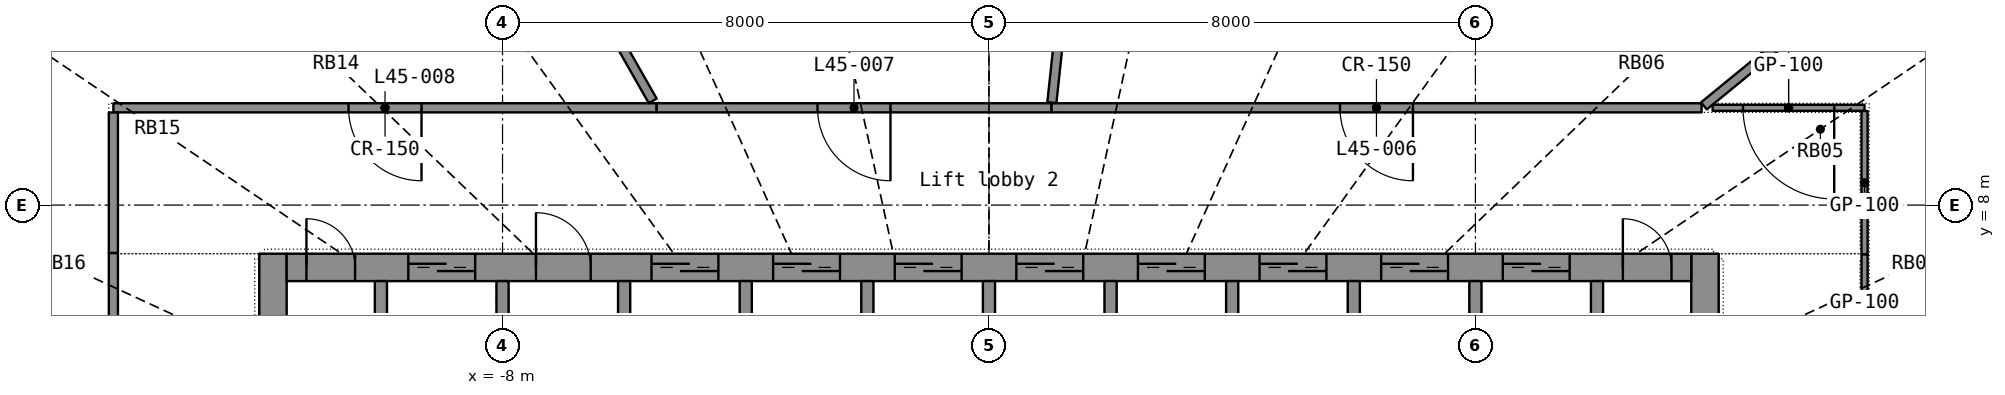
"""IFC4 building model, lengths in metres.
Left out: names, types, materials, properties, quantities, classifications, styles, units other than length and angle.
Written with IfcOpenShell. Run it as: python <this file> out.ifc"""

import sys

from ifc_helpers import new_model, si_unit, direction, frame, frame_2d, origin, place, context, subcontext, project, spatial, rectangle, extrude, element, fill, save


model = new_model("IFC4")
c1 = context("Model", 3, precision=1e-05, world=origin(), true_north=direction((0.0, 1.0)))
c2 = subcontext(c1, "Body", "Model", "MODEL_VIEW")
j1 = project(units=[si_unit("LENGTHUNIT", "METRE"), si_unit("PLANEANGLEUNIT", "RADIAN")], contexts=[c1])
p1 = place(None, origin())
s1 = spatial("IfcSite", under=j1, at=p1, CompositionType="ELEMENT")
p2 = place(p1, origin())
s2 = spatial("IfcBuilding", under=s1, at=p2, CompositionType="ELEMENT")
p3 = place(p2, frame((0.0, 0.0, 186.7)))
s3 = spatial("IfcBuildingStorey", under=s2, at=p3, CompositionType="ELEMENT", Elevation=186.7)
p4 = place(p3, frame((-11.775, -7.2, 0.0), z_axis=(0.0, 0.0, 1.0), x_axis=(0.0, 1.0, 0.0)))
e1 = element("IfcWall", 1, at=p4, inside=s3, PredefinedType="SHEAR", context=c2, shape_type="SweptSolid", body=[
    extrude(rectangle(XDim=14.4, YDim=0.45, at=frame_2d((7.2, 0.0))), origin(), (0.0, 0.0, 1.0), 3.3),
])
p5 = place(p4, frame((6.5, 0.0, 0.0)))
e2 = element("IfcOpeningElement", 2, at=p5, cuts=e1, PredefinedType="OPENING", context=c2, shape_type="SweptSolid", body=[
    extrude(rectangle(XDim=1.4, YDim=2.2, at=frame_2d((0.7, 1.1))), frame((0.0, 0.235, 0.0), z_axis=(0.0, -1.0, 0.0), x_axis=(1.0, 0.0, 0.0)), (0.0, 0.0, 1.0), 0.47),
])
p6 = place(p3, frame((11.775, -7.2, 0.0), z_axis=(0.0, 0.0, 1.0), x_axis=(0.0, 1.0, 0.0)))
e3 = element("IfcWall", 3, at=p6, inside=s3, PredefinedType="SHEAR", context=c2, shape_type="SweptSolid", body=[
    extrude(rectangle(XDim=14.4, YDim=0.45, at=frame_2d((7.2, 0.0))), origin(), (0.0, 0.0, 1.0), 3.3),
])
p7 = place(p6, frame((6.5, 0.0, 0.0)))
e4 = element("IfcOpeningElement", 4, at=p7, cuts=e3, PredefinedType="OPENING", context=c2, shape_type="SweptSolid", body=[
    extrude(rectangle(XDim=1.4, YDim=2.2, at=frame_2d((0.7, 1.1))), frame((0.0, 0.235, 0.0), z_axis=(0.0, -1.0, 0.0), x_axis=(1.0, 0.0, 0.0)), (0.0, 0.0, 1.0), 0.47),
])
p8 = place(p3, frame((-11.55, 6.975, 0.0), z_axis=(0.0, 0.0, 1.0), x_axis=(1.0, 0.0, 0.0)))
e5 = element("IfcWall", 5, at=p8, inside=s3, PredefinedType="SHEAR", context=c2, shape_type="SweptSolid", body=[
    extrude(rectangle(XDim=23.1, YDim=0.45, at=frame_2d((11.55, 0.0))), origin(), (0.0, 0.0, 1.0), 3.3),
])
p9 = place(p8, frame((2.0, 0.0, 0.0)))
e6 = element("IfcOpeningElement", 6, at=p9, cuts=e5, PredefinedType="OPENING", context=c2, shape_type="SweptSolid", body=[
    extrude(rectangle(XDim=1.1, YDim=2.2, at=frame_2d((0.55, 1.1))), frame((0.0, 0.235, 0.0), z_axis=(0.0, -1.0, 0.0), x_axis=(1.0, 0.0, 0.0)), (0.0, 0.0, 1.0), 0.47),
])
p10 = place(p8, frame((6.0, 0.0, 0.0)))
e7 = element("IfcOpeningElement", 7, at=p10, cuts=e5, PredefinedType="OPENING", context=c2, shape_type="SweptSolid", body=[
    extrude(rectangle(XDim=1.1, YDim=2.2, at=frame_2d((0.55, 1.1))), frame((0.0, 0.235, 0.0), z_axis=(0.0, -1.0, 0.0), x_axis=(1.0, 0.0, 0.0)), (0.0, 0.0, 1.0), 0.47),
])
p11 = place(p8, frame((8.0, 0.0, 0.0)))
e8 = element("IfcOpeningElement", 8, at=p11, cuts=e5, PredefinedType="OPENING", context=c2, shape_type="SweptSolid", body=[
    extrude(rectangle(XDim=1.1, YDim=2.2, at=frame_2d((0.55, 1.1))), frame((0.0, 0.235, 0.0), z_axis=(0.0, -1.0, 0.0), x_axis=(1.0, 0.0, 0.0)), (0.0, 0.0, 1.0), 0.47),
])
p12 = place(p8, frame((10.0, 0.0, 0.0)))
e9 = element("IfcOpeningElement", 9, at=p12, cuts=e5, PredefinedType="OPENING", context=c2, shape_type="SweptSolid", body=[
    extrude(rectangle(XDim=1.1, YDim=2.2, at=frame_2d((0.55, 1.1))), frame((0.0, 0.235, 0.0), z_axis=(0.0, -1.0, 0.0), x_axis=(1.0, 0.0, 0.0)), (0.0, 0.0, 1.0), 0.47),
])
p13 = place(p8, frame((12.0, 0.0, 0.0)))
e10 = element("IfcOpeningElement", 10, at=p13, cuts=e5, PredefinedType="OPENING", context=c2, shape_type="SweptSolid", body=[
    extrude(rectangle(XDim=1.1, YDim=2.2, at=frame_2d((0.55, 1.1))), frame((0.0, 0.235, 0.0), z_axis=(0.0, -1.0, 0.0), x_axis=(1.0, 0.0, 0.0)), (0.0, 0.0, 1.0), 0.47),
])
p14 = place(p8, frame((14.0, 0.0, 0.0)))
e11 = element("IfcOpeningElement", 11, at=p14, cuts=e5, PredefinedType="OPENING", context=c2, shape_type="SweptSolid", body=[
    extrude(rectangle(XDim=1.1, YDim=2.2, at=frame_2d((0.55, 1.1))), frame((0.0, 0.235, 0.0), z_axis=(0.0, -1.0, 0.0), x_axis=(1.0, 0.0, 0.0)), (0.0, 0.0, 1.0), 0.47),
])
p15 = place(p8, frame((16.0, 0.0, 0.0)))
e12 = element("IfcOpeningElement", 12, at=p15, cuts=e5, PredefinedType="OPENING", context=c2, shape_type="SweptSolid", body=[
    extrude(rectangle(XDim=1.1, YDim=2.2, at=frame_2d((0.55, 1.1))), frame((0.0, 0.235, 0.0), z_axis=(0.0, -1.0, 0.0), x_axis=(1.0, 0.0, 0.0)), (0.0, 0.0, 1.0), 0.47),
])
p16 = place(p8, frame((18.0, 0.0, 0.0)))
e13 = element("IfcOpeningElement", 13, at=p16, cuts=e5, PredefinedType="OPENING", context=c2, shape_type="SweptSolid", body=[
    extrude(rectangle(XDim=1.1, YDim=2.2, at=frame_2d((0.55, 1.1))), frame((0.0, 0.235, 0.0), z_axis=(0.0, -1.0, 0.0), x_axis=(1.0, 0.0, 0.0)), (0.0, 0.0, 1.0), 0.47),
])
p17 = place(p8, frame((20.0, 0.0, 0.0)))
e14 = element("IfcOpeningElement", 14, at=p17, cuts=e5, PredefinedType="OPENING", context=c2, shape_type="SweptSolid", body=[
    extrude(rectangle(XDim=1.1, YDim=2.2, at=frame_2d((0.55, 1.1))), frame((0.0, 0.235, 0.0), z_axis=(0.0, -1.0, 0.0), x_axis=(1.0, 0.0, 0.0)), (0.0, 0.0, 1.0), 0.47),
])
p18 = place(p8, frame((4.1, 0.0, 0.0)))
e15 = element("IfcOpeningElement", 15, at=p18, cuts=e5, PredefinedType="OPENING", context=c2, shape_type="SweptSolid", body=[
    extrude(rectangle(XDim=0.9, YDim=2.1, at=frame_2d((0.45, 1.05))), frame((0.0, 0.235, 0.0), z_axis=(0.0, -1.0, 0.0), x_axis=(1.0, 0.0, 0.0)), (0.0, 0.0, 1.0), 0.47),
])
p19 = place(p8, frame((0.325, 0.0, 0.0)))
e16 = element("IfcOpeningElement", 16, at=p19, cuts=e5, PredefinedType="OPENING", context=c2, shape_type="SweptSolid", body=[
    extrude(rectangle(XDim=0.8, YDim=2.05, at=frame_2d((0.4, 1.025))), frame((0.0, 0.235, 0.0), z_axis=(0.0, -1.0, 0.0), x_axis=(1.0, 0.0, 0.0)), (0.0, 0.0, 1.0), 0.47),
])
p20 = place(p8, frame((21.975, 0.0, 0.0)))
e17 = element("IfcOpeningElement", 17, at=p20, cuts=e5, PredefinedType="OPENING", context=c2, shape_type="SweptSolid", body=[
    extrude(rectangle(XDim=0.8, YDim=2.05, at=frame_2d((0.4, 1.025))), frame((0.0, 0.235, 0.0), z_axis=(0.0, -1.0, 0.0), x_axis=(1.0, 0.0, 0.0)), (0.0, 0.0, 1.0), 0.47),
])
for number, where, z_axis, x_axis in (
    (18, (-10.0, 3.9, 0.0), (0.0, 0.0, 1.0), (0.0, 1.0, 0.0)),
    (19, (-8.0, 3.9, 0.0), (0.0, 0.0, 1.0), (0.0, 1.0, 0.0)),
    (20, (-6.0, 3.9, 0.0), (0.0, 0.0, 1.0), (0.0, 1.0, 0.0)),
    (21, (-4.0, 3.9, 0.0), (0.0, 0.0, 1.0), (0.0, 1.0, 0.0)),
    (22, (-2.0, 3.9, 0.0), (0.0, 0.0, 1.0), (0.0, 1.0, 0.0)),
    (23, (0.0, 3.9, 0.0), (0.0, 0.0, 1.0), (0.0, 1.0, 0.0)),
    (24, (2.0, 3.9, 0.0), (0.0, 0.0, 1.0), (0.0, 1.0, 0.0)),
    (25, (4.0, 3.9, 0.0), (0.0, 0.0, 1.0), (0.0, 1.0, 0.0)),
    (26, (6.0, 3.9, 0.0), (0.0, 0.0, 1.0), (0.0, 1.0, 0.0)),
    (27, (8.0, 3.9, 0.0), (0.0, 0.0, 1.0), (0.0, 1.0, 0.0)),
    (28, (10.0, 3.9, 0.0), (0.0, 0.0, 1.0), (0.0, 1.0, 0.0)),
):
    element("IfcWall", number, at=place(p3, frame(where, z_axis=z_axis, x_axis=x_axis)), inside=s3, PredefinedType="SHEAR", context=c2, shape_type="SweptSolid", body=[
        extrude(rectangle(XDim=2.85, YDim=0.2, at=frame_2d((1.425, 0.0))), origin(), (0.0, 0.0, 1.0), 3.3),
    ])
p21 = place(p3, frame((11.72, 9.6, 0.0), z_axis=(0.0, 0.0, 1.0), x_axis=(-1.0, 0.0, 0.0)))
e29 = element("IfcWall", 29, at=p21, inside=s3, PredefinedType="PARTITIONING", context=c2, shape_type="SweptSolid", body=[
    extrude(rectangle(XDim=10.695, YDim=0.15, at=frame_2d((5.347, 0.0))), origin(), (0.0, 0.0, 1.0), 2.4),
])
p22 = place(p21, frame((4.747, 0.0, 0.0)))
e30 = element("IfcOpeningElement", 30, at=p22, cuts=e29, PredefinedType="OPENING", context=c2, shape_type="SweptSolid", body=[
    extrude(rectangle(XDim=1.2, YDim=2.2, at=frame_2d((0.6, 1.1))), frame((0.0, 0.085, 0.0), z_axis=(0.0, -1.0, 0.0), x_axis=(1.0, 0.0, 0.0)), (0.0, 0.0, 1.0), 0.17),
])
p23 = place(p3, frame((2.004, 18.766, 0.0), z_axis=(0.0, 0.0, 1.0), x_axis=(-0.106208417, -0.99434389, 0.0)))
e31 = element("IfcWall", 31, at=p23, inside=s3, PredefinedType="PARTITIONING", context=c2, shape_type="SweptSolid", body=[
    extrude(rectangle(XDim=9.133, YDim=0.15, at=frame_2d((4.566, 0.0))), origin(), (0.0, 0.0, 1.0), 2.4),
])
p24 = place(p3, frame((-5.465, 9.6, 0.0), z_axis=(0.0, 0.0, 1.0), x_axis=(-1.0, 0.0, 0.0)))
e32 = element("IfcWall", 32, at=p24, inside=s3, PredefinedType="PARTITIONING", context=c2, shape_type="SweptSolid", body=[
    extrude(rectangle(XDim=8.935, YDim=0.15, at=frame_2d((4.467, 0.0))), origin(), (0.0, 0.0, 1.0), 2.4),
])
p25 = place(p24, frame((3.867, 0.0, 0.0)))
e33 = element("IfcOpeningElement", 33, at=p25, cuts=e32, PredefinedType="OPENING", context=c2, shape_type="SweptSolid", body=[
    extrude(rectangle(XDim=1.2, YDim=2.2, at=frame_2d((0.6, 1.1))), frame((0.0, 0.085, 0.0), z_axis=(0.0, -1.0, 0.0), x_axis=(1.0, 0.0, 0.0)), (0.0, 0.0, 1.0), 0.17),
])
p26 = place(p3, frame((-9.722, 17.077, 0.0), z_axis=(0.0, 0.0, 1.0), x_axis=(0.494732537, -0.86904529, 0.0)))
e34 = element("IfcWall", 34, at=p26, inside=s3, PredefinedType="PARTITIONING", context=c2, shape_type="SweptSolid", body=[
    extrude(rectangle(XDim=8.473, YDim=0.15, at=frame_2d((4.236, 0.0))), origin(), (0.0, 0.0, 1.0), 2.4),
])
p27 = place(p3, frame((20.862, 7.969, 0.0), z_axis=(0.0, 0.0, 1.0), x_axis=(-0.934170905, -0.356825897, 0.0)))
e35 = element("IfcWall", 35, at=p27, inside=s3, PredefinedType="PARTITIONING", context=c2, shape_type="SweptSolid", body=[
    extrude(rectangle(XDim=6.917, YDim=0.15, at=frame_2d((3.458, 0.0))), origin(), (0.0, 0.0, 1.0), 2.4),
])
p28 = place(p3, frame((1.025, 9.6, 0.0), z_axis=(0.0, 0.0, 1.0), x_axis=(-1.0, 0.0, 0.0)))
e36 = element("IfcWall", 36, at=p28, inside=s3, PredefinedType="PARTITIONING", context=c2, shape_type="SweptSolid", body=[
    extrude(rectangle(XDim=6.49, YDim=0.15, at=frame_2d((3.245, 0.0))), origin(), (0.0, 0.0, 1.0), 2.4),
])
p29 = place(p28, frame((2.645, 0.0, 0.0)))
e37 = element("IfcOpeningElement", 37, at=p29, cuts=e36, PredefinedType="OPENING", context=c2, shape_type="SweptSolid", body=[
    extrude(rectangle(XDim=1.2, YDim=2.2, at=frame_2d((0.6, 1.1))), frame((0.0, 0.085, 0.0), z_axis=(0.0, -1.0, 0.0), x_axis=(1.0, 0.0, 0.0)), (0.0, 0.0, 1.0), 0.17),
])
p30 = place(p3, frame((16.27, 13.327, 0.0), z_axis=(0.0, 0.0, 1.0), x_axis=(-0.773587881, -0.633689033, 0.0)))
e38 = element("IfcWall", 38, at=p30, inside=s3, PredefinedType="PARTITIONING", context=c2, shape_type="SweptSolid", body=[
    extrude(rectangle(XDim=5.832, YDim=0.15, at=frame_2d((2.916, 0.0))), origin(), (0.0, 0.0, 1.0), 2.4),
])
p31 = place(p3, frame((-14.4, 7.212, 0.0), z_axis=(0.0, 0.0, 1.0), x_axis=(0.0, -1.0, 0.0)))
e39 = element("IfcWall", 39, at=p31, inside=s3, PredefinedType="PARTITIONING", context=c2, shape_type="SweptSolid", body=[
    extrude(rectangle(XDim=5.635, YDim=0.15, at=frame_2d((2.817, 0.0))), origin(), (0.0, 0.0, 1.0), 2.4),
])
p32 = place(p3, frame((14.4, 9.6, 0.0), z_axis=(0.0, 0.0, 1.0), x_axis=(-1.0, 0.0, 0.0)))
e40 = element("IfcWall", 40, at=p32, inside=s3, PredefinedType="PARTITIONING", context=c2, shape_type="SweptSolid", body=[
    extrude(rectangle(XDim=2.499, YDim=0.1, at=frame_2d((1.249, 0.0))), origin(), (0.0, 0.0, 1.0), 2.4),
])
p33 = place(p32, frame((0.499, 0.0, 0.0)))
e41 = element("IfcOpeningElement", 41, at=p33, cuts=e40, PredefinedType="OPENING", context=c2, shape_type="SweptSolid", body=[
    extrude(rectangle(XDim=1.5, YDim=2.4, at=frame_2d((0.75, 1.2))), frame((0.0, 0.06, 0.0), z_axis=(0.0, -1.0, 0.0), x_axis=(1.0, 0.0, 0.0)), (0.0, 0.0, 1.0), 0.12),
])
p34 = place(p3, frame((-14.4, 9.523, 0.0), z_axis=(0.0, 0.0, 1.0), x_axis=(0.0, -1.0, 0.0)))
e42 = element("IfcWall", 42, at=p34, inside=s3, PredefinedType="PARTITIONING", context=c2, shape_type="SweptSolid", body=[
    extrude(rectangle(XDim=2.31, YDim=0.15, at=frame_2d((1.155, 0.0))), origin(), (0.0, 0.0, 1.0), 2.4),
])
p35 = place(p3, frame((14.4, 7.188, 0.0), z_axis=(0.0, 0.0, 1.0), x_axis=(0.0, 1.0, 0.0)))
e43 = element("IfcWall", 43, at=p35, inside=s3, PredefinedType="PARTITIONING", context=c2, shape_type="SweptSolid", body=[
    extrude(rectangle(XDim=2.36, YDim=0.1, at=frame_2d((1.18, 0.0))), origin(), (0.0, 0.0, 1.0), 2.4),
])
p36 = place(p3, frame((14.4, 5.602, 0.0), z_axis=(0.0, 0.0, 1.0), x_axis=(0.0, 1.0, 0.0)))
e44 = element("IfcWall", 44, at=p36, inside=s3, PredefinedType="PARTITIONING", context=c2, shape_type="SweptSolid", body=[
    extrude(rectangle(XDim=1.585, YDim=0.1, at=frame_2d((0.793, 0.0))), origin(), (0.0, 0.0, 1.0), 2.4),
])
p37 = place(p9, origin())
e45 = element("IfcDoor", 45, at=p37, inside=s3, OperationType="DOUBLE_DOOR_SLIDING", PredefinedType="DOOR", context=c2, shape_type="SweptSolid", body=[
    extrude(rectangle(XDim=1.1, YDim=2.2, at=frame_2d((0.55, 1.1))), frame((0.0, 0.025, 0.0), z_axis=(0.0, -1.0, 0.0), x_axis=(1.0, 0.0, 0.0)), (0.0, 0.0, 1.0), 0.05),
])
fill(e6, e45)
p38 = place(p10, origin())
e46 = element("IfcDoor", 46, at=p38, inside=s3, OperationType="DOUBLE_DOOR_SLIDING", PredefinedType="DOOR", context=c2, shape_type="SweptSolid", body=[
    extrude(rectangle(XDim=1.1, YDim=2.2, at=frame_2d((0.55, 1.1))), frame((0.0, 0.025, 0.0), z_axis=(0.0, -1.0, 0.0), x_axis=(1.0, 0.0, 0.0)), (0.0, 0.0, 1.0), 0.05),
])
fill(e7, e46)
p39 = place(p11, origin())
e47 = element("IfcDoor", 47, at=p39, inside=s3, OperationType="DOUBLE_DOOR_SLIDING", PredefinedType="DOOR", context=c2, shape_type="SweptSolid", body=[
    extrude(rectangle(XDim=1.1, YDim=2.2, at=frame_2d((0.55, 1.1))), frame((0.0, 0.025, 0.0), z_axis=(0.0, -1.0, 0.0), x_axis=(1.0, 0.0, 0.0)), (0.0, 0.0, 1.0), 0.05),
])
fill(e8, e47)
p40 = place(p12, origin())
e48 = element("IfcDoor", 48, at=p40, inside=s3, OperationType="DOUBLE_DOOR_SLIDING", PredefinedType="DOOR", context=c2, shape_type="SweptSolid", body=[
    extrude(rectangle(XDim=1.1, YDim=2.2, at=frame_2d((0.55, 1.1))), frame((0.0, 0.025, 0.0), z_axis=(0.0, -1.0, 0.0), x_axis=(1.0, 0.0, 0.0)), (0.0, 0.0, 1.0), 0.05),
])
fill(e9, e48)
p41 = place(p13, origin())
e49 = element("IfcDoor", 49, at=p41, inside=s3, OperationType="DOUBLE_DOOR_SLIDING", PredefinedType="DOOR", context=c2, shape_type="SweptSolid", body=[
    extrude(rectangle(XDim=1.1, YDim=2.2, at=frame_2d((0.55, 1.1))), frame((0.0, 0.025, 0.0), z_axis=(0.0, -1.0, 0.0), x_axis=(1.0, 0.0, 0.0)), (0.0, 0.0, 1.0), 0.05),
])
fill(e10, e49)
p42 = place(p14, origin())
e50 = element("IfcDoor", 50, at=p42, inside=s3, OperationType="DOUBLE_DOOR_SLIDING", PredefinedType="DOOR", context=c2, shape_type="SweptSolid", body=[
    extrude(rectangle(XDim=1.1, YDim=2.2, at=frame_2d((0.55, 1.1))), frame((0.0, 0.025, 0.0), z_axis=(0.0, -1.0, 0.0), x_axis=(1.0, 0.0, 0.0)), (0.0, 0.0, 1.0), 0.05),
])
fill(e11, e50)
p43 = place(p15, origin())
e51 = element("IfcDoor", 51, at=p43, inside=s3, OperationType="DOUBLE_DOOR_SLIDING", PredefinedType="DOOR", context=c2, shape_type="SweptSolid", body=[
    extrude(rectangle(XDim=1.1, YDim=2.2, at=frame_2d((0.55, 1.1))), frame((0.0, 0.025, 0.0), z_axis=(0.0, -1.0, 0.0), x_axis=(1.0, 0.0, 0.0)), (0.0, 0.0, 1.0), 0.05),
])
fill(e12, e51)
p44 = place(p16, origin())
e52 = element("IfcDoor", 52, at=p44, inside=s3, OperationType="DOUBLE_DOOR_SLIDING", PredefinedType="DOOR", context=c2, shape_type="SweptSolid", body=[
    extrude(rectangle(XDim=1.1, YDim=2.2, at=frame_2d((0.55, 1.1))), frame((0.0, 0.025, 0.0), z_axis=(0.0, -1.0, 0.0), x_axis=(1.0, 0.0, 0.0)), (0.0, 0.0, 1.0), 0.05),
])
fill(e13, e52)
p45 = place(p17, origin())
e53 = element("IfcDoor", 53, at=p45, inside=s3, OperationType="DOUBLE_DOOR_SLIDING", PredefinedType="DOOR", context=c2, shape_type="SweptSolid", body=[
    extrude(rectangle(XDim=1.1, YDim=2.2, at=frame_2d((0.55, 1.1))), frame((0.0, 0.025, 0.0), z_axis=(0.0, -1.0, 0.0), x_axis=(1.0, 0.0, 0.0)), (0.0, 0.0, 1.0), 0.05),
])
fill(e14, e53)
p46 = place(p18, origin())
e54 = element("IfcDoor", 54, at=p46, inside=s3, OperationType="SINGLE_SWING_LEFT", PredefinedType="DOOR", context=c2, shape_type="SweptSolid", body=[
    extrude(rectangle(XDim=0.9, YDim=2.1, at=frame_2d((0.45, 1.05))), frame((0.0, 0.025, 0.0), z_axis=(0.0, -1.0, 0.0), x_axis=(1.0, 0.0, 0.0)), (0.0, 0.0, 1.0), 0.05),
])
fill(e15, e54)
p47 = place(p19, origin())
e55 = element("IfcDoor", 55, at=p47, inside=s3, OperationType="SINGLE_SWING_LEFT", PredefinedType="DOOR", context=c2, shape_type="SweptSolid", body=[
    extrude(rectangle(XDim=0.8, YDim=2.05, at=frame_2d((0.4, 1.025))), frame((0.0, 0.025, 0.0), z_axis=(0.0, -1.0, 0.0), x_axis=(1.0, 0.0, 0.0)), (0.0, 0.0, 1.0), 0.05),
])
fill(e16, e55)
p48 = place(p20, origin())
e56 = element("IfcDoor", 56, at=p48, inside=s3, OperationType="SINGLE_SWING_LEFT", PredefinedType="DOOR", context=c2, shape_type="SweptSolid", body=[
    extrude(rectangle(XDim=0.8, YDim=2.05, at=frame_2d((0.4, 1.025))), frame((0.0, 0.025, 0.0), z_axis=(0.0, -1.0, 0.0), x_axis=(1.0, 0.0, 0.0)), (0.0, 0.0, 1.0), 0.05),
])
fill(e17, e56)
p49 = place(p33, origin())
e57 = element("IfcDoor", 57, at=p49, inside=s3, OperationType="DOUBLE_DOOR_SINGLE_SWING", PredefinedType="DOOR", context=c2, shape_type="SweptSolid", body=[
    extrude(rectangle(XDim=1.5, YDim=2.4, at=frame_2d((0.75, 1.2))), frame((0.0, 0.025, 0.0), z_axis=(0.0, -1.0, 0.0), x_axis=(1.0, 0.0, 0.0)), (0.0, 0.0, 1.0), 0.05),
])
fill(e41, e57)
p50 = place(p22, origin())
e58 = element("IfcDoor", 58, at=p50, inside=s3, OperationType="DOUBLE_DOOR_SINGLE_SWING", PredefinedType="DOOR", context=c2, shape_type="SweptSolid", body=[
    extrude(rectangle(XDim=1.2, YDim=2.2, at=frame_2d((0.6, 1.1))), frame((0.0, 0.025, 0.0), z_axis=(0.0, -1.0, 0.0), x_axis=(1.0, 0.0, 0.0)), (0.0, 0.0, 1.0), 0.05),
])
fill(e30, e58)
p51 = place(p29, origin())
e59 = element("IfcDoor", 59, at=p51, inside=s3, OperationType="DOUBLE_DOOR_SINGLE_SWING", PredefinedType="DOOR", context=c2, shape_type="SweptSolid", body=[
    extrude(rectangle(XDim=1.2, YDim=2.2, at=frame_2d((0.6, 1.1))), frame((0.0, 0.025, 0.0), z_axis=(0.0, -1.0, 0.0), x_axis=(1.0, 0.0, 0.0)), (0.0, 0.0, 1.0), 0.05),
])
fill(e37, e59)
p52 = place(p25, origin())
e60 = element("IfcDoor", 60, at=p52, inside=s3, OperationType="DOUBLE_DOOR_SINGLE_SWING", PredefinedType="DOOR", context=c2, shape_type="SweptSolid", body=[
    extrude(rectangle(XDim=1.2, YDim=2.2, at=frame_2d((0.6, 1.1))), frame((0.0, 0.025, 0.0), z_axis=(0.0, -1.0, 0.0), x_axis=(1.0, 0.0, 0.0)), (0.0, 0.0, 1.0), 0.05),
])
fill(e33, e60)
save(model, sys.argv[1])
